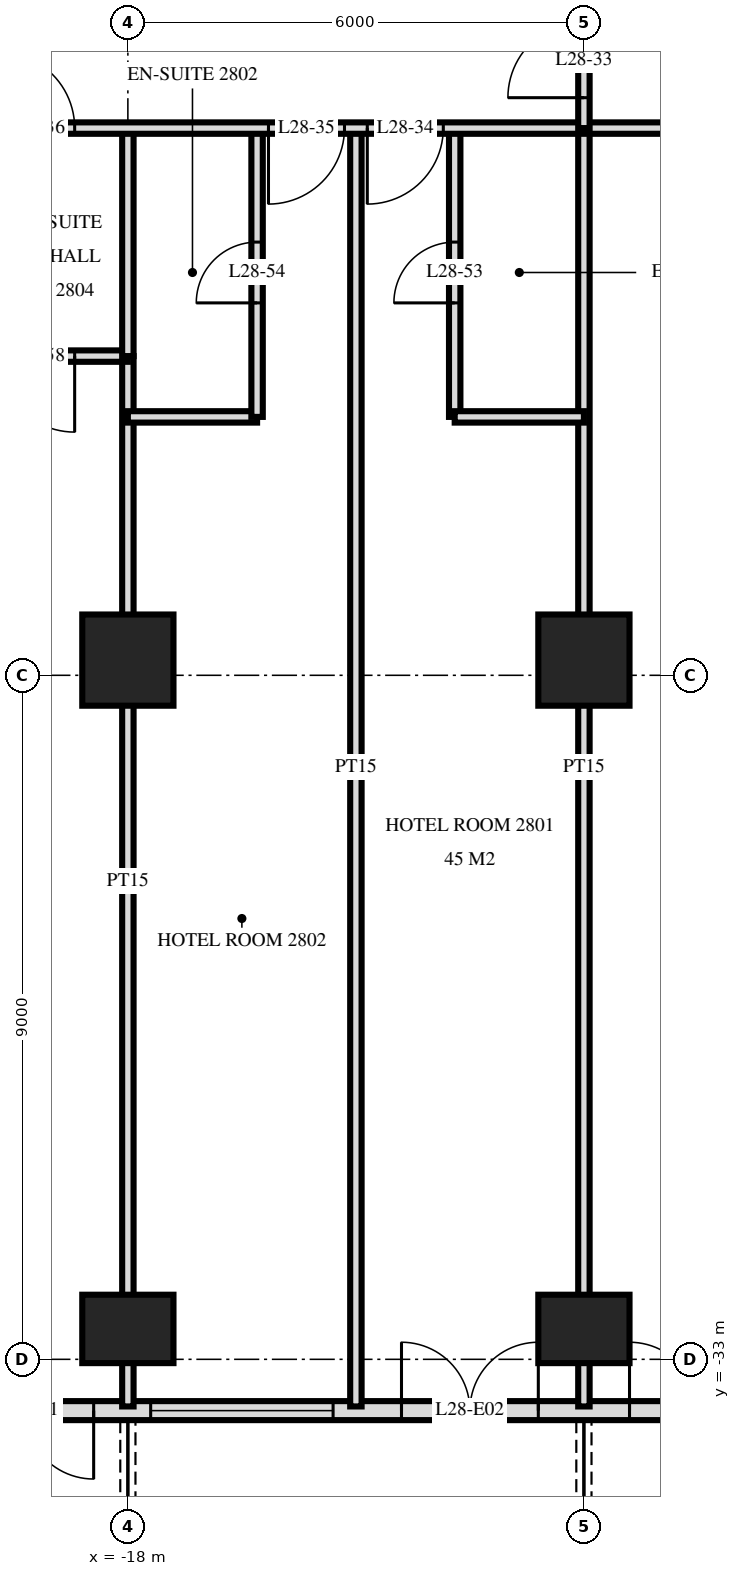
"""IFC4 building model, lengths in metres.
Left out: names, types, materials, properties, quantities, classifications, styles, units other than length and angle.
Written with IfcOpenShell. Run it as: python <this file> out.ifc"""

import sys

from ifc_helpers import new_model, si_unit, direction, frame, frame_2d, origin, origin_2d, place, context, subcontext, project, spatial, rectangle, extrude, element, fill, save


model = new_model("IFC4")
c1 = context("Model", 3, precision=1e-05, world=origin(), true_north=direction((0.0, 1.0)))
c2 = subcontext(c1, "Body", "Model", "MODEL_VIEW")
j1 = project(units=[si_unit("LENGTHUNIT", "METRE"), si_unit("PLANEANGLEUNIT", "RADIAN")], contexts=[c1])
p1 = place(None, origin())
s1 = spatial("IfcSite", under=j1, at=p1, CompositionType="ELEMENT")
p2 = place(p1, origin())
s2 = spatial("IfcBuilding", under=s1, at=p2, CompositionType="ELEMENT")
p3 = place(p2, frame((0.0, 0.0, 112.8)))
s3 = spatial("IfcBuildingStorey", under=s2, at=p3, CompositionType="ELEMENT", Elevation=112.8)
p4 = place(p3, frame((-18.0, -32.6, -0.28), z_axis=(0.0, 0.0, 1.0), x_axis=(1.0, 0.0, 0.0)))
e1 = element("IfcColumn", 1, at=p4, inside=s3, PredefinedType="COLUMN", context=c2, shape_type="SweptSolid", body=[
    extrude(rectangle(XDim=1.2, YDim=0.9, at=origin_2d()), origin(), (0.0, 0.0, 1.0), 3.88),
])
p5 = place(p3, frame((-18.0, -23.8, -0.28), z_axis=(0.0, 0.0, 1.0), x_axis=(1.0, 0.0, 0.0)))
e2 = element("IfcColumn", 2, at=p5, inside=s3, PredefinedType="COLUMN", context=c2, shape_type="SweptSolid", body=[
    extrude(rectangle(XDim=1.2, YDim=1.2, at=origin_2d()), origin(), (0.0, 0.0, 1.0), 3.88),
])
p6 = place(p3, frame((-12.0, -32.6, -0.28), z_axis=(0.0, 0.0, 1.0), x_axis=(1.0, 0.0, 0.0)))
e3 = element("IfcColumn", 3, at=p6, inside=s3, PredefinedType="COLUMN", context=c2, shape_type="SweptSolid", body=[
    extrude(rectangle(XDim=1.2, YDim=0.9, at=origin_2d()), origin(), (0.0, 0.0, 1.0), 3.88),
])
p7 = place(p3, frame((-12.0, -23.8, -0.28), z_axis=(0.0, 0.0, 1.0), x_axis=(1.0, 0.0, 0.0)))
e4 = element("IfcColumn", 4, at=p7, inside=s3, PredefinedType="COLUMN", context=c2, shape_type="SweptSolid", body=[
    extrude(rectangle(XDim=1.2, YDim=1.2, at=origin_2d()), origin(), (0.0, 0.0, 1.0), 3.88),
])
p8 = place(p3, frame((-23.675, -33.675, 0.0), z_axis=(0.0, 0.0, 1.0), x_axis=(1.0, 0.0, 0.0)))
e5 = element("IfcWall", 5, at=p8, inside=s3, PredefinedType="SOLIDWALL", context=c2, shape_type="SweptSolid", body=[
    extrude(rectangle(XDim=47.351, YDim=0.25, at=frame_2d((23.675, 0.0))), origin(), (0.0, 0.0, 1.0), 3.32),
])
p9 = place(p8, frame((0.275, 0.0, 0.3)))
e6 = element("IfcOpeningElement", 6, at=p9, cuts=e5, PredefinedType="OPENING", context=c2, shape_type="SweptSolid", body=[
    extrude(rectangle(XDim=2.4, YDim=2.1, at=frame_2d((1.2, 1.05))), frame((0.0, 0.135, 0.0), z_axis=(0.0, -1.0, 0.0), x_axis=(1.0, 0.0, 0.0)), (0.0, 0.0, 1.0), 0.27),
])
p10 = place(p8, frame((3.425, 0.0, 0.0)))
e7 = element("IfcOpeningElement", 7, at=p10, cuts=e5, PredefinedType="OPENING", context=c2, shape_type="SweptSolid", body=[
    extrude(rectangle(XDim=1.8, YDim=2.4, at=frame_2d((0.9, 1.2))), frame((0.0, 0.135, 0.0), z_axis=(0.0, -1.0, 0.0), x_axis=(1.0, 0.0, 0.0)), (0.0, 0.0, 1.0), 0.27),
])
p11 = place(p8, frame((5.975, 0.0, 0.3)))
e8 = element("IfcOpeningElement", 8, at=p11, cuts=e5, PredefinedType="OPENING", context=c2, shape_type="SweptSolid", body=[
    extrude(rectangle(XDim=2.4, YDim=2.1, at=frame_2d((1.2, 1.05))), frame((0.0, 0.135, 0.0), z_axis=(0.0, -1.0, 0.0), x_axis=(1.0, 0.0, 0.0)), (0.0, 0.0, 1.0), 0.27),
])
p12 = place(p8, frame((9.275, 0.0, 0.0)))
e9 = element("IfcOpeningElement", 9, at=p12, cuts=e5, PredefinedType="OPENING", context=c2, shape_type="SweptSolid", body=[
    extrude(rectangle(XDim=1.8, YDim=2.4, at=frame_2d((0.9, 1.2))), frame((0.0, 0.135, 0.0), z_axis=(0.0, -1.0, 0.0), x_axis=(1.0, 0.0, 0.0)), (0.0, 0.0, 1.0), 0.27),
])
p13 = place(p8, frame((12.275, 0.0, 0.0)))
e10 = element("IfcOpeningElement", 10, at=p13, cuts=e5, PredefinedType="OPENING", context=c2, shape_type="SweptSolid", body=[
    extrude(rectangle(XDim=1.8, YDim=2.4, at=frame_2d((0.9, 1.2))), frame((0.0, 0.135, 0.0), z_axis=(0.0, -1.0, 0.0), x_axis=(1.0, 0.0, 0.0)), (0.0, 0.0, 1.0), 0.27),
])
p14 = place(p8, frame((14.975, 0.0, 0.3)))
e11 = element("IfcOpeningElement", 11, at=p14, cuts=e5, PredefinedType="OPENING", context=c2, shape_type="SweptSolid", body=[
    extrude(rectangle(XDim=2.4, YDim=2.1, at=frame_2d((1.2, 1.05))), frame((0.0, 0.135, 0.0), z_axis=(0.0, -1.0, 0.0), x_axis=(1.0, 0.0, 0.0)), (0.0, 0.0, 1.0), 0.27),
])
p15 = place(p8, frame((17.975, 0.0, 0.3)))
e12 = element("IfcOpeningElement", 12, at=p15, cuts=e5, PredefinedType="OPENING", context=c2, shape_type="SweptSolid", body=[
    extrude(rectangle(XDim=2.4, YDim=2.1, at=frame_2d((1.2, 1.05))), frame((0.0, 0.135, 0.0), z_axis=(0.0, -1.0, 0.0), x_axis=(1.0, 0.0, 0.0)), (0.0, 0.0, 1.0), 0.27),
])
p16 = place(p8, frame((21.275, 0.0, 0.0)))
e13 = element("IfcOpeningElement", 13, at=p16, cuts=e5, PredefinedType="OPENING", context=c2, shape_type="SweptSolid", body=[
    extrude(rectangle(XDim=1.8, YDim=2.4, at=frame_2d((0.9, 1.2))), frame((0.0, 0.135, 0.0), z_axis=(0.0, -1.0, 0.0), x_axis=(1.0, 0.0, 0.0)), (0.0, 0.0, 1.0), 0.27),
])
p17 = place(p8, frame((24.275, 0.0, 0.0)))
e14 = element("IfcOpeningElement", 14, at=p17, cuts=e5, PredefinedType="OPENING", context=c2, shape_type="SweptSolid", body=[
    extrude(rectangle(XDim=1.8, YDim=2.4, at=frame_2d((0.9, 1.2))), frame((0.0, 0.135, 0.0), z_axis=(0.0, -1.0, 0.0), x_axis=(1.0, 0.0, 0.0)), (0.0, 0.0, 1.0), 0.27),
])
p18 = place(p8, frame((26.975, 0.0, 0.3)))
e15 = element("IfcOpeningElement", 15, at=p18, cuts=e5, PredefinedType="OPENING", context=c2, shape_type="SweptSolid", body=[
    extrude(rectangle(XDim=2.4, YDim=2.1, at=frame_2d((1.2, 1.05))), frame((0.0, 0.135, 0.0), z_axis=(0.0, -1.0, 0.0), x_axis=(1.0, 0.0, 0.0)), (0.0, 0.0, 1.0), 0.27),
])
p19 = place(p8, frame((30.275, 0.0, 0.0)))
e16 = element("IfcOpeningElement", 16, at=p19, cuts=e5, PredefinedType="OPENING", context=c2, shape_type="SweptSolid", body=[
    extrude(rectangle(XDim=1.8, YDim=2.4, at=frame_2d((0.9, 1.2))), frame((0.0, 0.135, 0.0), z_axis=(0.0, -1.0, 0.0), x_axis=(1.0, 0.0, 0.0)), (0.0, 0.0, 1.0), 0.27),
])
p20 = place(p8, frame((32.975, 0.0, 0.3)))
e17 = element("IfcOpeningElement", 17, at=p20, cuts=e5, PredefinedType="OPENING", context=c2, shape_type="SweptSolid", body=[
    extrude(rectangle(XDim=2.4, YDim=2.1, at=frame_2d((1.2, 1.05))), frame((0.0, 0.135, 0.0), z_axis=(0.0, -1.0, 0.0), x_axis=(1.0, 0.0, 0.0)), (0.0, 0.0, 1.0), 0.27),
])
p21 = place(p8, frame((35.975, 0.0, 0.3)))
e18 = element("IfcOpeningElement", 18, at=p21, cuts=e5, PredefinedType="OPENING", context=c2, shape_type="SweptSolid", body=[
    extrude(rectangle(XDim=2.4, YDim=2.1, at=frame_2d((1.2, 1.05))), frame((0.0, 0.135, 0.0), z_axis=(0.0, -1.0, 0.0), x_axis=(1.0, 0.0, 0.0)), (0.0, 0.0, 1.0), 0.27),
])
p22 = place(p8, frame((39.275, 0.0, 0.0)))
e19 = element("IfcOpeningElement", 19, at=p22, cuts=e5, PredefinedType="OPENING", context=c2, shape_type="SweptSolid", body=[
    extrude(rectangle(XDim=1.8, YDim=2.4, at=frame_2d((0.9, 1.2))), frame((0.0, 0.135, 0.0), z_axis=(0.0, -1.0, 0.0), x_axis=(1.0, 0.0, 0.0)), (0.0, 0.0, 1.0), 0.27),
])
p23 = place(p8, frame((41.975, 0.0, 0.3)))
e20 = element("IfcOpeningElement", 20, at=p23, cuts=e5, PredefinedType="OPENING", context=c2, shape_type="SweptSolid", body=[
    extrude(rectangle(XDim=2.4, YDim=2.1, at=frame_2d((1.2, 1.05))), frame((0.0, 0.135, 0.0), z_axis=(0.0, -1.0, 0.0), x_axis=(1.0, 0.0, 0.0)), (0.0, 0.0, 1.0), 0.27),
])
p24 = place(p8, frame((45.125, 0.0, 0.0)))
e21 = element("IfcOpeningElement", 21, at=p24, cuts=e5, PredefinedType="OPENING", context=c2, shape_type="SweptSolid", body=[
    extrude(rectangle(XDim=1.8, YDim=2.4, at=frame_2d((0.9, 1.2))), frame((0.0, 0.135, 0.0), z_axis=(0.0, -1.0, 0.0), x_axis=(1.0, 0.0, 0.0)), (0.0, 0.0, 1.0), 0.27),
])
p25 = place(p3, frame((-12.0, -16.8, 0.0), z_axis=(0.0, 0.0, 1.0), x_axis=(0.0, 1.0, 0.0)))
e22 = element("IfcWall", 22, at=p25, inside=s3, PredefinedType="PARTITIONING", context=c2, shape_type="SweptSolid", body=[
    extrude(rectangle(XDim=1.75, YDim=0.15, at=frame_2d((0.875, 0.0))), origin(), (0.0, 0.0, 1.0), 3.32),
])
p26 = place(p25, frame((0.4, 0.0, 0.0)))
e23 = element("IfcOpeningElement", 23, at=p26, cuts=e22, PredefinedType="OPENING", context=c2, shape_type="SweptSolid", body=[
    extrude(rectangle(XDim=1.0, YDim=2.1, at=frame_2d((0.5, 1.05))), frame((0.0, 0.085, 0.0), z_axis=(0.0, -1.0, 0.0), x_axis=(1.0, 0.0, 0.0)), (0.0, 0.0, 1.0), 0.17),
])
p27 = place(p3, frame((-12.0, -33.62, 0.0), z_axis=(0.0, 0.0, 1.0), x_axis=(0.0, 1.0, 0.0)))
e24 = element("IfcWall", 24, at=p27, inside=s3, PredefinedType="PARTITIONING", context=c2, shape_type="SweptSolid", body=[
    extrude(rectangle(XDim=16.82, YDim=0.15, at=frame_2d((8.41, 0.0))), origin(), (0.0, 0.0, 1.0), 3.32),
])
p28 = place(p3, frame((-13.7, -20.6, 0.0), z_axis=(0.0, 0.0, 1.0), x_axis=(0.0, 1.0, 0.0)))
e25 = element("IfcWall", 25, at=p28, inside=s3, PredefinedType="PARTITIONING", context=c2, shape_type="SweptSolid", body=[
    extrude(rectangle(XDim=3.8, YDim=0.15, at=frame_2d((1.9, 0.0))), origin(), (0.0, 0.0, 1.0), 3.32),
])
p29 = place(p28, frame((1.5, 0.0, 0.0)))
e26 = element("IfcOpeningElement", 26, at=p29, cuts=e25, PredefinedType="OPENING", context=c2, shape_type="SweptSolid", body=[
    extrude(rectangle(XDim=0.8, YDim=2.1, at=frame_2d((0.4, 1.05))), frame((0.0, 0.085, 0.0), z_axis=(0.0, -1.0, 0.0), x_axis=(1.0, 0.0, 0.0)), (0.0, 0.0, 1.0), 0.17),
])
p30 = place(p3, frame((-15.0, -33.62, 0.0), z_axis=(0.0, 0.0, 1.0), x_axis=(0.0, 1.0, 0.0)))
e27 = element("IfcWall", 27, at=p30, inside=s3, PredefinedType="PARTITIONING", context=c2, shape_type="SweptSolid", body=[
    extrude(rectangle(XDim=16.82, YDim=0.15, at=frame_2d((8.41, 0.0))), origin(), (0.0, 0.0, 1.0), 3.32),
])
p31 = place(p3, frame((-16.3, -20.6, 0.0), z_axis=(0.0, 0.0, 1.0), x_axis=(0.0, 1.0, 0.0)))
e28 = element("IfcWall", 28, at=p31, inside=s3, PredefinedType="PARTITIONING", context=c2, shape_type="SweptSolid", body=[
    extrude(rectangle(XDim=3.8, YDim=0.15, at=frame_2d((1.9, 0.0))), origin(), (0.0, 0.0, 1.0), 3.32),
])
p32 = place(p31, frame((1.5, 0.0, 0.0)))
e29 = element("IfcOpeningElement", 29, at=p32, cuts=e28, PredefinedType="OPENING", context=c2, shape_type="SweptSolid", body=[
    extrude(rectangle(XDim=0.8, YDim=2.1, at=frame_2d((0.4, 1.05))), frame((0.0, 0.085, 0.0), z_axis=(0.0, -1.0, 0.0), x_axis=(1.0, 0.0, 0.0)), (0.0, 0.0, 1.0), 0.17),
])
p33 = place(p3, frame((-18.0, -19.8, 0.0), z_axis=(0.0, 0.0, 1.0), x_axis=(0.0, 1.0, 0.0)))
e30 = element("IfcWall", 30, at=p33, inside=s3, PredefinedType="PARTITIONING", context=c2, shape_type="SweptSolid", body=[
    extrude(rectangle(XDim=3.0, YDim=0.15, at=frame_2d((1.5, 0.0))), origin(), (0.0, 0.0, 1.0), 3.32),
])
p34 = place(p3, frame((-18.0, -33.62, 0.0), z_axis=(0.0, 0.0, 1.0), x_axis=(0.0, 1.0, 0.0)))
e31 = element("IfcWall", 31, at=p34, inside=s3, PredefinedType="PARTITIONING", context=c2, shape_type="SweptSolid", body=[
    extrude(rectangle(XDim=13.82, YDim=0.15, at=frame_2d((6.91, 0.0))), origin(), (0.0, 0.0, 1.0), 3.32),
])
for number, where, z_axis, x_axis in (
    (32, (-18.0, -20.6, 0.0), (0.0, 0.0, 1.0), (1.0, 0.0, 0.0)),
    (33, (-13.7, -20.6, 0.0), (0.0, 0.0, 1.0), (1.0, 0.0, 0.0)),
):
    element("IfcWall", number, at=place(p3, frame(where, z_axis=z_axis, x_axis=x_axis)), inside=s3, PredefinedType="PARTITIONING", context=c2, shape_type="SweptSolid", body=[
        extrude(rectangle(XDim=1.7, YDim=0.15, at=frame_2d((0.85, 0.0))), origin(), (0.0, 0.0, 1.0), 3.32),
    ])
p35 = place(p3, frame((-20.4, -19.8, 0.0), z_axis=(0.0, 0.0, 1.0), x_axis=(1.0, 0.0, 0.0)))
e34 = element("IfcWall", 34, at=p35, inside=s3, PredefinedType="PARTITIONING", context=c2, shape_type="SweptSolid", body=[
    extrude(rectangle(XDim=2.4, YDim=0.15, at=frame_2d((1.2, 0.0))), origin(), (0.0, 0.0, 1.0), 3.32),
])
p36 = place(p35, frame((0.7, 0.0, 0.0)))
e35 = element("IfcOpeningElement", 35, at=p36, cuts=e34, PredefinedType="OPENING", context=c2, shape_type="SweptSolid", body=[
    extrude(rectangle(XDim=1.0, YDim=2.1, at=frame_2d((0.5, 1.05))), frame((0.0, 0.085, 0.0), z_axis=(0.0, -1.0, 0.0), x_axis=(1.0, 0.0, 0.0)), (0.0, 0.0, 1.0), 0.17),
])
p37 = place(p3, frame((-28.02, -16.8, 0.0), z_axis=(0.0, 0.0, 1.0), x_axis=(1.0, 0.0, 0.0)))
e36 = element("IfcWall", 36, at=p37, inside=s3, PredefinedType="PARTITIONING", context=c2, shape_type="SweptSolid", body=[
    extrude(rectangle(XDim=56.04, YDim=0.15, at=frame_2d((28.02, 0.0))), origin(), (0.0, 0.0, 1.0), 3.32),
])
p38 = place(p37, frame((13.17, 0.0, 0.0)))
e37 = element("IfcOpeningElement", 37, at=p38, cuts=e36, PredefinedType="OPENING", context=c2, shape_type="SweptSolid", body=[
    extrude(rectangle(XDim=1.0, YDim=2.1, at=frame_2d((0.5, 1.05))), frame((0.0, 0.085, 0.0), z_axis=(0.0, -1.0, 0.0), x_axis=(1.0, 0.0, 0.0)), (0.0, 0.0, 1.0), 0.17),
])
p39 = place(p37, frame((11.87, 0.0, 0.0)))
e38 = element("IfcOpeningElement", 38, at=p39, cuts=e36, PredefinedType="OPENING", context=c2, shape_type="SweptSolid", body=[
    extrude(rectangle(XDim=1.0, YDim=2.1, at=frame_2d((0.5, 1.05))), frame((0.0, 0.085, 0.0), z_axis=(0.0, -1.0, 0.0), x_axis=(1.0, 0.0, 0.0)), (0.0, 0.0, 1.0), 0.17),
])
p40 = place(p37, frame((8.32, 0.0, 0.0)))
e39 = element("IfcOpeningElement", 39, at=p40, cuts=e36, PredefinedType="OPENING", context=c2, shape_type="SweptSolid", body=[
    extrude(rectangle(XDim=1.0, YDim=2.1, at=frame_2d((0.5, 1.05))), frame((0.0, 0.085, 0.0), z_axis=(0.0, -1.0, 0.0), x_axis=(1.0, 0.0, 0.0)), (0.0, 0.0, 1.0), 0.17),
])
p41 = place(p37, frame((40.42, 0.0, 0.0)))
e40 = element("IfcOpeningElement", 40, at=p41, cuts=e36, PredefinedType="OPENING", context=c2, shape_type="SweptSolid", body=[
    extrude(rectangle(XDim=1.0, YDim=2.1, at=frame_2d((0.5, 1.05))), frame((0.0, 0.085, 0.0), z_axis=(0.0, -1.0, 0.0), x_axis=(1.0, 0.0, 0.0)), (0.0, 0.0, 1.0), 0.17),
])
p42 = place(p37, frame((46.72, 0.0, 0.0)))
e41 = element("IfcOpeningElement", 41, at=p42, cuts=e36, PredefinedType="OPENING", context=c2, shape_type="SweptSolid", body=[
    extrude(rectangle(XDim=1.0, YDim=2.1, at=frame_2d((0.5, 1.05))), frame((0.0, 0.085, 0.0), z_axis=(0.0, -1.0, 0.0), x_axis=(1.0, 0.0, 0.0)), (0.0, 0.0, 1.0), 0.17),
])
p43 = place(p37, frame((21.52, 0.0, 0.0)))
e42 = element("IfcOpeningElement", 42, at=p43, cuts=e36, PredefinedType="OPENING", context=c2, shape_type="SweptSolid", body=[
    extrude(rectangle(XDim=1.0, YDim=2.1, at=frame_2d((0.5, 1.05))), frame((0.0, 0.085, 0.0), z_axis=(0.0, -1.0, 0.0), x_axis=(1.0, 0.0, 0.0)), (0.0, 0.0, 1.0), 0.17),
])
p44 = place(p37, frame((30.52, 0.0, 0.0)))
e43 = element("IfcOpeningElement", 43, at=p44, cuts=e36, PredefinedType="OPENING", context=c2, shape_type="SweptSolid", body=[
    extrude(rectangle(XDim=1.0, YDim=2.1, at=frame_2d((0.5, 1.05))), frame((0.0, 0.085, 0.0), z_axis=(0.0, -1.0, 0.0), x_axis=(1.0, 0.0, 0.0)), (0.0, 0.0, 1.0), 0.17),
])
p45 = place(p37, frame((36.52, 0.0, 0.0)))
e44 = element("IfcOpeningElement", 44, at=p45, cuts=e36, PredefinedType="OPENING", context=c2, shape_type="SweptSolid", body=[
    extrude(rectangle(XDim=1.0, YDim=2.1, at=frame_2d((0.5, 1.05))), frame((0.0, 0.085, 0.0), z_axis=(0.0, -1.0, 0.0), x_axis=(1.0, 0.0, 0.0)), (0.0, 0.0, 1.0), 0.17),
])
p46 = place(p10, frame((0.9, 0.0, 0.0), z_axis=(0.0, 0.0, 1.0), x_axis=(-1.0, 0.0, 0.0)))
e45 = element("IfcDoor", 45, at=p46, inside=s3, OperationType="DOUBLE_DOOR_SINGLE_SWING", PredefinedType="DOOR", context=c2, shape_type="SweptSolid", body=[
    extrude(rectangle(XDim=1.8, YDim=2.4, at=frame_2d((0.0, 1.2))), frame((0.0, -0.025, 0.0), z_axis=(0.0, 1.0, 0.0), x_axis=(-1.0, 0.0, 0.0)), (0.0, 0.0, 1.0), 0.05),
])
fill(e7, e45)
p47 = place(p11, origin())
e46 = element("IfcWindow", 46, at=p47, inside=s3, PartitioningType="SINGLE_PANEL", PredefinedType="WINDOW", context=c2, shape_type="SweptSolid", body=[
    extrude(rectangle(XDim=2.4, YDim=2.1, at=frame_2d((1.2, 1.05))), frame((0.0, 0.03, 0.0), z_axis=(0.0, -1.0, 0.0), x_axis=(1.0, 0.0, 0.0)), (0.0, 0.0, 1.0), 0.06),
])
fill(e8, e46)
p48 = place(p12, origin())
e47 = element("IfcDoor", 47, at=p48, inside=s3, OperationType="DOUBLE_DOOR_SINGLE_SWING", PredefinedType="DOOR", context=c2, shape_type="SweptSolid", body=[
    extrude(rectangle(XDim=1.8, YDim=2.4, at=frame_2d((0.9, 1.2))), frame((0.0, 0.025, 0.0), z_axis=(0.0, -1.0, 0.0), x_axis=(1.0, 0.0, 0.0)), (0.0, 0.0, 1.0), 0.05),
])
fill(e9, e47)
p49 = place(p13, origin())
e48 = element("IfcDoor", 48, at=p49, inside=s3, OperationType="DOUBLE_DOOR_SINGLE_SWING", PredefinedType="DOOR", context=c2, shape_type="SweptSolid", body=[
    extrude(rectangle(XDim=1.8, YDim=2.4, at=frame_2d((0.9, 1.2))), frame((0.0, 0.025, 0.0), z_axis=(0.0, -1.0, 0.0), x_axis=(1.0, 0.0, 0.0)), (0.0, 0.0, 1.0), 0.05),
])
fill(e10, e48)
p50 = place(p26, origin())
e49 = element("IfcDoor", 49, at=p50, inside=s3, OperationType="SINGLE_SWING_RIGHT", PredefinedType="DOOR", context=c2, shape_type="SweptSolid", body=[
    extrude(rectangle(XDim=1.0, YDim=2.1, at=frame_2d((0.5, 1.05))), frame((0.0, 0.025, 0.0), z_axis=(0.0, -1.0, 0.0), x_axis=(1.0, 0.0, 0.0)), (0.0, 0.0, 1.0), 0.05),
])
fill(e23, e49)
p51 = place(p38, frame((0.5, 0.0, 0.0), z_axis=(0.0, 0.0, 1.0), x_axis=(-1.0, 0.0, 0.0)))
e50 = element("IfcDoor", 50, at=p51, inside=s3, OperationType="SINGLE_SWING_LEFT", PredefinedType="DOOR", context=c2, shape_type="SweptSolid", body=[
    extrude(rectangle(XDim=1.0, YDim=2.1, at=frame_2d((0.0, 1.05))), frame((0.0, -0.025, 0.0), z_axis=(0.0, 1.0, 0.0), x_axis=(-1.0, 0.0, 0.0)), (0.0, 0.0, 1.0), 0.05),
])
fill(e37, e50)
p52 = place(p39, frame((0.5, 0.0, 0.0), z_axis=(0.0, 0.0, 1.0), x_axis=(-1.0, 0.0, 0.0)))
e51 = element("IfcDoor", 51, at=p52, inside=s3, OperationType="SINGLE_SWING_LEFT", PredefinedType="DOOR", context=c2, shape_type="SweptSolid", body=[
    extrude(rectangle(XDim=1.0, YDim=2.1, at=frame_2d((0.0, 1.05))), frame((0.0, -0.025, 0.0), z_axis=(0.0, 1.0, 0.0), x_axis=(-1.0, 0.0, 0.0)), (0.0, 0.0, 1.0), 0.05),
])
fill(e38, e51)
p53 = place(p40, origin())
e52 = element("IfcDoor", 52, at=p53, inside=s3, OperationType="SINGLE_SWING_RIGHT", PredefinedType="DOOR", context=c2, shape_type="SweptSolid", body=[
    extrude(rectangle(XDim=1.0, YDim=2.1, at=frame_2d((0.5, 1.05))), frame((0.0, 0.025, 0.0), z_axis=(0.0, -1.0, 0.0), x_axis=(1.0, 0.0, 0.0)), (0.0, 0.0, 1.0), 0.05),
])
fill(e39, e52)
p54 = place(p29, origin())
e53 = element("IfcDoor", 53, at=p54, inside=s3, OperationType="SINGLE_SWING_RIGHT", PredefinedType="DOOR", context=c2, shape_type="SweptSolid", body=[
    extrude(rectangle(XDim=0.8, YDim=2.1, at=frame_2d((0.4, 1.05))), frame((0.0, 0.025, 0.0), z_axis=(0.0, -1.0, 0.0), x_axis=(1.0, 0.0, 0.0)), (0.0, 0.0, 1.0), 0.05),
])
fill(e26, e53)
p55 = place(p32, origin())
e54 = element("IfcDoor", 54, at=p55, inside=s3, OperationType="SINGLE_SWING_RIGHT", PredefinedType="DOOR", context=c2, shape_type="SweptSolid", body=[
    extrude(rectangle(XDim=0.8, YDim=2.1, at=frame_2d((0.4, 1.05))), frame((0.0, 0.025, 0.0), z_axis=(0.0, -1.0, 0.0), x_axis=(1.0, 0.0, 0.0)), (0.0, 0.0, 1.0), 0.05),
])
fill(e29, e54)
p56 = place(p36, frame((0.5, 0.0, 0.0), z_axis=(0.0, 0.0, 1.0), x_axis=(-1.0, 0.0, 0.0)))
e55 = element("IfcDoor", 55, at=p56, inside=s3, OperationType="SINGLE_SWING_RIGHT", PredefinedType="DOOR", context=c2, shape_type="SweptSolid", body=[
    extrude(rectangle(XDim=1.0, YDim=2.1, at=frame_2d((0.0, 1.05))), frame((0.0, -0.025, 0.0), z_axis=(0.0, 1.0, 0.0), x_axis=(-1.0, 0.0, 0.0)), (0.0, 0.0, 1.0), 0.05),
])
fill(e35, e55)
save(model, sys.argv[1])
